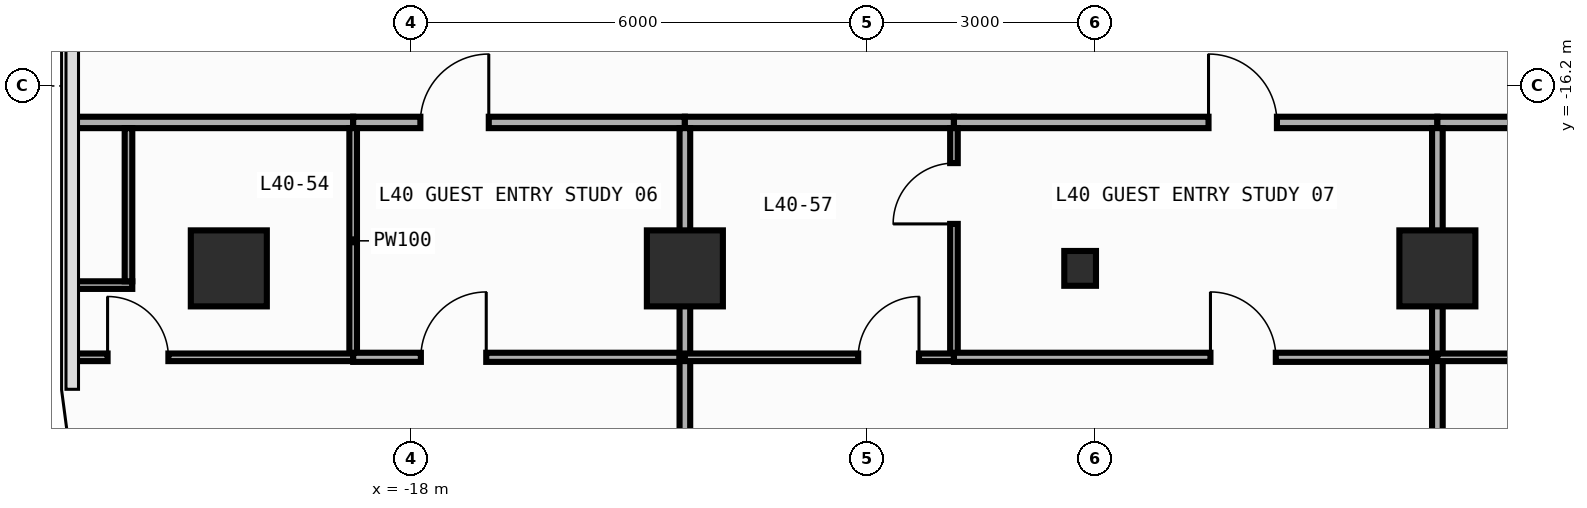
"""IFC4 building model, lengths in metres.
Left out: names, types, materials, properties, quantities, classifications, styles, units other than length and angle.
Written with IfcOpenShell. Run it as: python <this file> out.ifc"""

import sys

from ifc_helpers import new_model, si_unit, direction, frame, frame_2d, origin, origin_2d, place, context, subcontext, project, spatial, rectangle, i_section, extrude, element, fill, save


model = new_model("IFC4")
c1 = context("Model", 3, precision=1e-05, world=origin(), true_north=direction((0.0, 1.0)))
c2 = subcontext(c1, "Body", "Model", "MODEL_VIEW")
j1 = project(units=[si_unit("LENGTHUNIT", "METRE"), si_unit("PLANEANGLEUNIT", "RADIAN")], contexts=[c1])
p1 = place(None, origin())
s1 = spatial("IfcSite", under=j1, at=p1, CompositionType="ELEMENT")
p2 = place(p1, origin())
s2 = spatial("IfcBuilding", under=s1, at=p2, CompositionType="ELEMENT")
p3 = place(p2, frame((0.0, 0.0, 176.4)))
s3 = spatial("IfcBuildingStorey", under=s2, at=p3, CompositionType="ELEMENT", Elevation=176.4)
p4 = place(p3, frame((-9.2, -18.6, 0.0), z_axis=(0.0, 0.0, 1.0), x_axis=(1.0, 0.0, 0.0)))
e1 = element("IfcColumn", 1, at=p4, inside=s3, PredefinedType="COLUMN", context=c2, shape_type="SweptSolid", body=[
    extrude(i_section(OverallWidth=0.417, OverallDepth=0.458, WebThickness=0.03, FlangeThickness=0.05, FilletRadius=0.022, at=origin_2d()), origin(), (0.0, 0.0, 1.0), 3.8),
])
for number, where, z_axis, x_axis in (
    (2, (-20.4, -18.6, 0.0), (0.0, 0.0, 1.0), (1.0, 0.0, 0.0)),
    (3, (-14.4, -18.6, 0.0), (0.0, 0.0, 1.0), (1.0, 0.0, 0.0)),
    (4, (-4.5, -18.6, 0.0), (0.0, 0.0, 1.0), (1.0, 0.0, 0.0)),
):
    element("IfcColumn", number, at=place(p3, frame(where, z_axis=z_axis, x_axis=x_axis)), inside=s3, PredefinedType="COLUMN", context=c2, shape_type="SweptSolid", body=[
        extrude(rectangle(XDim=1.0, YDim=1.0, at=origin_2d()), origin(), (0.0, 0.0, 1.0), 3.8),
    ])
p5 = place(p3, frame((-22.455, -16.68, 0.0), z_axis=(0.0, 0.0, 1.0), x_axis=(1.0, 0.0, 0.0)))
e5 = element("IfcWall", 5, at=p5, inside=s3, PredefinedType="PARTITIONING", context=c2, shape_type="SweptSolid", body=[
    extrude(rectangle(XDim=3.691, YDim=0.15, at=frame_2d((1.846, 0.0))), origin(), (0.0, 0.0, 1.0), 3.54),
])
p6 = place(p3, frame((-18.764, -16.68, 0.0), z_axis=(0.0, 0.0, 1.0), x_axis=(1.0, 0.0, 0.0)))
e6 = element("IfcWall", 6, at=p6, inside=s3, PredefinedType="PARTITIONING", context=c2, shape_type="SweptSolid", body=[
    extrude(rectangle(XDim=4.364, YDim=0.15, at=frame_2d((2.182, 0.0))), origin(), (0.0, 0.0, 1.0), 3.54),
])
p7 = place(p6, frame((0.884, 0.0, 0.0)))
e7 = element("IfcOpeningElement", 7, at=p7, cuts=e6, PredefinedType="OPENING", context=c2, shape_type="SweptSolid", body=[
    extrude(rectangle(XDim=0.9, YDim=2.15, at=frame_2d((0.45, 1.075))), frame((0.0, 0.085, 0.0), z_axis=(0.0, -1.0, 0.0), x_axis=(1.0, 0.0, 0.0)), (0.0, 0.0, 1.0), 0.17),
])
p8 = place(p3, frame((-14.4, -16.68, 0.0), z_axis=(0.0, 0.0, 1.0), x_axis=(1.0, 0.0, 0.0)))
e8 = element("IfcWall", 8, at=p8, inside=s3, PredefinedType="PARTITIONING", context=c2, shape_type="SweptSolid", body=[
    extrude(rectangle(XDim=3.54, YDim=0.15, at=frame_2d((1.77, 0.0))), origin(), (0.0, 0.0, 1.0), 3.54),
])
p9 = place(p3, frame((-10.86, -16.68, 0.0), z_axis=(0.0, 0.0, 1.0), x_axis=(1.0, 0.0, 0.0)))
e9 = element("IfcWall", 9, at=p9, inside=s3, PredefinedType="PARTITIONING", context=c2, shape_type="SweptSolid", body=[
    extrude(rectangle(XDim=6.36, YDim=0.15, at=frame_2d((3.18, 0.0))), origin(), (0.0, 0.0, 1.0), 3.54),
])
p10 = place(p9, frame((3.349, 0.0, 0.0)))
e10 = element("IfcOpeningElement", 10, at=p10, cuts=e9, PredefinedType="OPENING", context=c2, shape_type="SweptSolid", body=[
    extrude(rectangle(XDim=0.9, YDim=2.15, at=frame_2d((0.45, 1.075))), frame((0.0, 0.085, 0.0), z_axis=(0.0, -1.0, 0.0), x_axis=(1.0, 0.0, 0.0)), (0.0, 0.0, 1.0), 0.17),
])
p11 = place(p3, frame((-4.5, -16.68, 0.0), z_axis=(0.0, 0.0, 1.0), x_axis=(1.0, 0.0, 0.0)))
e11 = element("IfcWall", 11, at=p11, inside=s3, PredefinedType="PARTITIONING", context=c2, shape_type="SweptSolid", body=[
    extrude(rectangle(XDim=3.54, YDim=0.15, at=frame_2d((1.77, 0.0))), origin(), (0.0, 0.0, 1.0), 3.54),
])
p12 = place(p3, frame((-18.764, -19.72, 0.0), z_axis=(0.0, 0.0, 1.0), x_axis=(0.0, 1.0, 0.0)))
e12 = element("IfcWall", 12, at=p12, inside=s3, PredefinedType="PARTITIONING", context=c2, shape_type="SweptSolid", body=[
    extrude(rectangle(XDim=2.965, YDim=0.1, at=frame_2d((1.482, 0.0))), origin(), (0.0, 0.0, 1.0), 3.54),
])
p13 = place(p3, frame((-22.455, -19.77, 0.0), z_axis=(0.0, 0.0, 1.0), x_axis=(1.0, 0.0, 0.0)))
e13 = element("IfcWall", 13, at=p13, inside=s3, PredefinedType="PARTITIONING", context=c2, shape_type="SweptSolid", body=[
    extrude(rectangle(XDim=3.691, YDim=0.1, at=frame_2d((1.846, 0.0))), origin(), (0.0, 0.0, 1.0), 3.54),
])
p14 = place(p13, frame((0.46, 0.0, 0.0)))
e14 = element("IfcOpeningElement", 14, at=p14, cuts=e13, PredefinedType="OPENING", context=c2, shape_type="SweptSolid", body=[
    extrude(rectangle(XDim=0.8, YDim=2.1, at=frame_2d((0.4, 1.05))), frame((0.0, 0.06, 0.0), z_axis=(0.0, -1.0, 0.0), x_axis=(1.0, 0.0, 0.0)), (0.0, 0.0, 1.0), 0.12),
])
p15 = place(p3, frame((-18.764, -19.77, 0.0), z_axis=(0.0, 0.0, 1.0), x_axis=(1.0, 0.0, 0.0)))
e15 = element("IfcWall", 15, at=p15, inside=s3, PredefinedType="PARTITIONING", context=c2, shape_type="SweptSolid", body=[
    extrude(rectangle(XDim=4.364, YDim=0.12, at=frame_2d((2.182, 0.0))), origin(), (0.0, 0.0, 1.0), 3.54),
])
p16 = place(p15, frame((0.891, 0.0, 0.0)))
e16 = element("IfcOpeningElement", 16, at=p16, cuts=e15, PredefinedType="OPENING", context=c2, shape_type="SweptSolid", body=[
    extrude(rectangle(XDim=0.86, YDim=2.15, at=frame_2d((0.43, 1.075))), frame((0.0, 0.07, 0.0), z_axis=(0.0, -1.0, 0.0), x_axis=(1.0, 0.0, 0.0)), (0.0, 0.0, 1.0), 0.14),
])
p17 = place(p3, frame((-14.4, -19.77, 0.0), z_axis=(0.0, 0.0, 1.0), x_axis=(0.0, 1.0, 0.0)))
e17 = element("IfcWall", 17, at=p17, inside=s3, PredefinedType="PARTITIONING", context=c2, shape_type="SweptSolid", body=[
    extrude(rectangle(XDim=3.015, YDim=0.14, at=frame_2d((1.508, 0.0))), origin(), (0.0, 0.0, 1.0), 2.952),
])
p18 = place(p3, frame((-14.4, -25.341, 0.0), z_axis=(0.0, 0.0, 1.0), x_axis=(0.0, 1.0, 0.0)))
e18 = element("IfcWall", 18, at=p18, inside=s3, PredefinedType="PARTITIONING", context=c2, shape_type="SweptSolid", body=[
    extrude(rectangle(XDim=5.571, YDim=0.14, at=frame_2d((2.785, 0.0))), origin(), (0.0, 0.0, 1.0), 2.952),
])
p19 = place(p3, frame((-10.86, -19.72, 0.0), z_axis=(0.0, 0.0, 1.0), x_axis=(0.0, 1.0, 0.0)))
e19 = element("IfcWall", 19, at=p19, inside=s3, PredefinedType="PARTITIONING", context=c2, shape_type="SweptSolid", body=[
    extrude(rectangle(XDim=2.965, YDim=0.1, at=frame_2d((1.482, 0.0))), origin(), (0.0, 0.0, 1.0), 3.54),
])
p20 = place(p19, frame((1.705, 0.0, 0.0)))
e20 = element("IfcOpeningElement", 20, at=p20, cuts=e19, PredefinedType="OPENING", context=c2, shape_type="SweptSolid", body=[
    extrude(rectangle(XDim=0.8, YDim=2.1, at=frame_2d((0.4, 1.05))), frame((0.0, 0.06, 0.0), z_axis=(0.0, -1.0, 0.0), x_axis=(1.0, 0.0, 0.0)), (0.0, 0.0, 1.0), 0.12),
])
p21 = place(p3, frame((-14.4, -19.77, 0.0), z_axis=(0.0, 0.0, 1.0), x_axis=(1.0, 0.0, 0.0)))
e21 = element("IfcWall", 21, at=p21, inside=s3, PredefinedType="PARTITIONING", context=c2, shape_type="SweptSolid", body=[
    extrude(rectangle(XDim=3.54, YDim=0.1, at=frame_2d((1.77, 0.0))), origin(), (0.0, 0.0, 1.0), 3.54),
])
p22 = place(p21, frame((2.28, 0.0, 0.0)))
e22 = element("IfcOpeningElement", 22, at=p22, cuts=e21, PredefinedType="OPENING", context=c2, shape_type="SweptSolid", body=[
    extrude(rectangle(XDim=0.8, YDim=2.1, at=frame_2d((0.4, 1.05))), frame((0.0, 0.06, 0.0), z_axis=(0.0, -1.0, 0.0), x_axis=(1.0, 0.0, 0.0)), (0.0, 0.0, 1.0), 0.12),
])
p23 = place(p3, frame((-10.86, -19.77, 0.0), z_axis=(0.0, 0.0, 1.0), x_axis=(1.0, 0.0, 0.0)))
e23 = element("IfcWall", 23, at=p23, inside=s3, PredefinedType="PARTITIONING", context=c2, shape_type="SweptSolid", body=[
    extrude(rectangle(XDim=6.36, YDim=0.12, at=frame_2d((3.18, 0.0))), origin(), (0.0, 0.0, 1.0), 3.54),
])
p24 = place(p23, frame((3.375, 0.0, 0.0)))
e24 = element("IfcOpeningElement", 24, at=p24, cuts=e23, PredefinedType="OPENING", context=c2, shape_type="SweptSolid", body=[
    extrude(rectangle(XDim=0.86, YDim=2.15, at=frame_2d((0.43, 1.075))), frame((0.0, 0.07, 0.0), z_axis=(0.0, -1.0, 0.0), x_axis=(1.0, 0.0, 0.0)), (0.0, 0.0, 1.0), 0.14),
])
p25 = place(p3, frame((-4.5, -19.77, 0.0), z_axis=(0.0, 0.0, 1.0), x_axis=(0.0, 1.0, 0.0)))
e25 = element("IfcWall", 25, at=p25, inside=s3, PredefinedType="PARTITIONING", context=c2, shape_type="SweptSolid", body=[
    extrude(rectangle(XDim=3.015, YDim=0.14, at=frame_2d((1.508, 0.0))), origin(), (0.0, 0.0, 1.0), 3.54),
])
p26 = place(p3, frame((-4.5, -25.292, 0.0), z_axis=(0.0, 0.0, 1.0), x_axis=(0.0, 1.0, 0.0)))
e26 = element("IfcWall", 26, at=p26, inside=s3, PredefinedType="PARTITIONING", context=c2, shape_type="SweptSolid", body=[
    extrude(rectangle(XDim=5.522, YDim=0.14, at=frame_2d((2.761, 0.0))), origin(), (0.0, 0.0, 1.0), 3.54),
])
p27 = place(p3, frame((-4.5, -19.77, 0.0), z_axis=(0.0, 0.0, 1.0), x_axis=(1.0, 0.0, 0.0)))
e27 = element("IfcWall", 27, at=p27, inside=s3, PredefinedType="PARTITIONING", context=c2, shape_type="SweptSolid", body=[
    extrude(rectangle(XDim=3.54, YDim=0.1, at=frame_2d((1.77, 0.0))), origin(), (0.0, 0.0, 1.0), 3.54),
])
p28 = place(p27, frame((1.875, 0.0, 0.0)))
e28 = element("IfcOpeningElement", 28, at=p28, cuts=e27, PredefinedType="OPENING", context=c2, shape_type="SweptSolid", body=[
    extrude(rectangle(XDim=0.8, YDim=2.1, at=frame_2d((0.4, 1.05))), frame((0.0, 0.06, 0.0), z_axis=(0.0, -1.0, 0.0), x_axis=(1.0, 0.0, 0.0)), (0.0, 0.0, 1.0), 0.12),
])
p29 = place(p3, frame((-21.67, -18.82, 0.0), z_axis=(0.0, 0.0, 1.0), x_axis=(-1.0, 0.0, 0.0)))
e29 = element("IfcWall", 29, at=p29, inside=s3, PredefinedType="PARTITIONING", context=c2, shape_type="SweptSolid", body=[
    extrude(rectangle(XDim=0.785, YDim=0.1, at=frame_2d((0.393, 0.0))), origin(), (0.0, 0.0, 1.0), 3.54),
])
p30 = place(p3, frame((-21.72, -18.77, 0.0), z_axis=(0.0, 0.0, 1.0), x_axis=(0.0, 1.0, 0.0)))
e30 = element("IfcWall", 30, at=p30, inside=s3, PredefinedType="PARTITIONING", context=c2, shape_type="SweptSolid", body=[
    extrude(rectangle(XDim=2.015, YDim=0.1, at=frame_2d((1.008, 0.0))), origin(), (0.0, 0.0, 1.0), 3.54),
])
p31 = place(p7, origin())
e31 = element("IfcDoor", 31, at=p31, inside=s3, OperationType="SINGLE_SWING_RIGHT", PredefinedType="DOOR", context=c2, shape_type="SweptSolid", body=[
    extrude(rectangle(XDim=0.9, YDim=2.15, at=frame_2d((0.45, 1.075))), frame((0.0, 0.025, 0.0), z_axis=(0.0, -1.0, 0.0), x_axis=(1.0, 0.0, 0.0)), (0.0, 0.0, 1.0), 0.05),
])
fill(e7, e31)
p32 = place(p10, origin())
e32 = element("IfcDoor", 32, at=p32, inside=s3, OperationType="SINGLE_SWING_LEFT", PredefinedType="DOOR", context=c2, shape_type="SweptSolid", body=[
    extrude(rectangle(XDim=0.9, YDim=2.15, at=frame_2d((0.45, 1.075))), frame((0.0, 0.025, 0.0), z_axis=(0.0, -1.0, 0.0), x_axis=(1.0, 0.0, 0.0)), (0.0, 0.0, 1.0), 0.05),
])
fill(e10, e32)
p33 = place(p14, origin())
e33 = element("IfcDoor", 33, at=p33, inside=s3, OperationType="SINGLE_SWING_LEFT", PredefinedType="DOOR", context=c2, shape_type="SweptSolid", body=[
    extrude(rectangle(XDim=0.8, YDim=2.1, at=frame_2d((0.4, 1.05))), frame((0.0, 0.025, 0.0), z_axis=(0.0, -1.0, 0.0), x_axis=(1.0, 0.0, 0.0)), (0.0, 0.0, 1.0), 0.05),
])
fill(e14, e33)
p34 = place(p16, origin())
e34 = element("IfcDoor", 34, at=p34, inside=s3, OperationType="SINGLE_SWING_RIGHT", PredefinedType="DOOR", context=c2, shape_type="SweptSolid", body=[
    extrude(rectangle(XDim=0.86, YDim=2.15, at=frame_2d((0.43, 1.075))), frame((0.0, 0.025, 0.0), z_axis=(0.0, -1.0, 0.0), x_axis=(1.0, 0.0, 0.0)), (0.0, 0.0, 1.0), 0.05),
])
fill(e16, e34)
p35 = place(p20, origin())
e35 = element("IfcDoor", 35, at=p35, inside=s3, OperationType="SINGLE_SWING_LEFT", PredefinedType="DOOR", context=c2, shape_type="SweptSolid", body=[
    extrude(rectangle(XDim=0.8, YDim=2.1, at=frame_2d((0.4, 1.05))), frame((0.0, 0.025, 0.0), z_axis=(0.0, -1.0, 0.0), x_axis=(1.0, 0.0, 0.0)), (0.0, 0.0, 1.0), 0.05),
])
fill(e20, e35)
p36 = place(p22, origin())
e36 = element("IfcDoor", 36, at=p36, inside=s3, OperationType="SINGLE_SWING_RIGHT", PredefinedType="DOOR", context=c2, shape_type="SweptSolid", body=[
    extrude(rectangle(XDim=0.8, YDim=2.1, at=frame_2d((0.4, 1.05))), frame((0.0, 0.025, 0.0), z_axis=(0.0, -1.0, 0.0), x_axis=(1.0, 0.0, 0.0)), (0.0, 0.0, 1.0), 0.05),
])
fill(e22, e36)
p37 = place(p24, origin())
e37 = element("IfcDoor", 37, at=p37, inside=s3, OperationType="SINGLE_SWING_LEFT", PredefinedType="DOOR", context=c2, shape_type="SweptSolid", body=[
    extrude(rectangle(XDim=0.86, YDim=2.15, at=frame_2d((0.43, 1.075))), frame((0.0, 0.025, 0.0), z_axis=(0.0, -1.0, 0.0), x_axis=(1.0, 0.0, 0.0)), (0.0, 0.0, 1.0), 0.05),
])
fill(e24, e37)
save(model, sys.argv[1])
